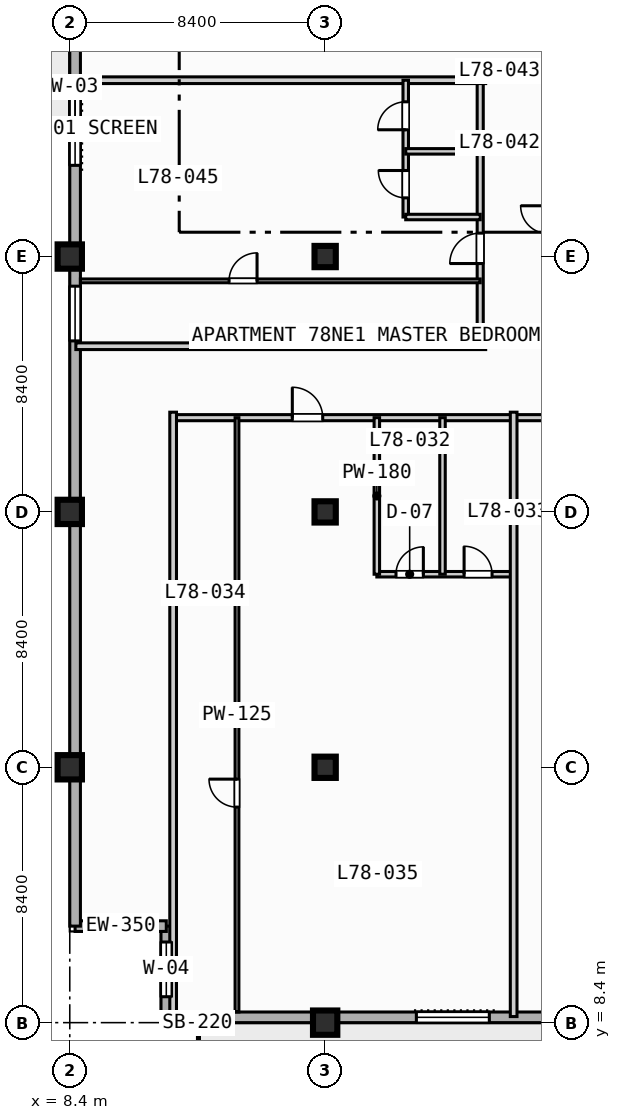
"""IFC4 building model, lengths in metres.
Left out: names, types, materials, properties, quantities, classifications, styles, units other than length and angle.
Written with IfcOpenShell. Run it as: python <this file> out.ifc"""

import sys

from ifc_helpers import new_model, si_unit, direction, frame, frame_2d, origin, origin_2d, place, context, subcontext, project, spatial, rectangle, extrude, element, fill, save


model = new_model("IFC4")
c1 = context("Model", 3, precision=1e-05, world=origin(), true_north=direction((0.0, 1.0)))
c2 = subcontext(c1, "Body", "Model", "MODEL_VIEW")
j1 = project(units=[si_unit("LENGTHUNIT", "METRE"), si_unit("PLANEANGLEUNIT", "RADIAN")], contexts=[c1])
p1 = place(None, origin())
s1 = spatial("IfcSite", under=j1, at=p1, CompositionType="ELEMENT")
p2 = place(p1, origin())
s2 = spatial("IfcBuilding", under=s1, at=p2, CompositionType="ELEMENT")
p3 = place(p2, frame((0.0, 0.0, 316.4)))
s3 = spatial("IfcBuildingStorey", under=s2, at=p3, CompositionType="ELEMENT", Elevation=316.4)
for number, where, z_axis, x_axis in (
    (1, (8.4, 16.8, 0.0), (0.0, 0.0, 1.0), (1.0, 0.0, 0.0)),
    (2, (8.4, 25.2, 0.0), (0.0, 0.0, 1.0), (1.0, 0.0, 0.0)),
    (3, (8.4, 33.6, 0.0), (0.0, 0.0, 1.0), (1.0, 0.0, 0.0)),
    (4, (16.8, 8.4, 0.0), (0.0, 0.0, 1.0), (1.0, 0.0, 0.0)),
):
    element("IfcColumn", number, at=place(p3, frame(where, z_axis=z_axis, x_axis=x_axis)), inside=s3, PredefinedType="COLUMN", context=c2, shape_type="SweptSolid", body=[
        extrude(rectangle(XDim=0.8, YDim=0.8, at=origin_2d()), origin(), (0.0, 0.0, 1.0), 3.9),
    ])
for number, where, z_axis, x_axis in (
    (5, (16.8, 16.8, 0.0), (0.0, 0.0, 1.0), (1.0, 0.0, 0.0)),
    (6, (16.8, 25.2, 0.0), (0.0, 0.0, 1.0), (1.0, 0.0, 0.0)),
    (7, (16.8, 33.6, 0.0), (0.0, 0.0, 1.0), (1.0, 0.0, 0.0)),
):
    element("IfcColumn", number, at=place(p3, frame(where, z_axis=z_axis, x_axis=x_axis)), inside=s3, PredefinedType="COLUMN", context=c2, shape_type="SweptSolid", body=[
        extrude(rectangle(XDim=0.7, YDim=0.7, at=origin_2d()), origin(), (0.0, 0.0, 1.0), 3.9),
    ])
p4 = place(p3, frame((11.575, 8.575, 0.0), z_axis=(0.0, 0.0, 1.0), x_axis=(0.0, 1.0, 0.0)))
e8 = element("IfcWall", 8, at=p4, inside=s3, PredefinedType="STANDARD", context=c2, shape_type="SweptSolid", body=[
    extrude(rectangle(XDim=3.0, YDim=0.35, at=frame_2d((1.5, 0.0))), origin(), (0.0, 0.0, 1.0), 3.67),
])
p5 = place(p4, frame((0.677, 0.0, 0.85)))
e9 = element("IfcOpeningElement", 9, at=p5, cuts=e8, PredefinedType="OPENING", context=c2, shape_type="SweptSolid", body=[
    extrude(rectangle(XDim=1.8, YDim=1.8, at=frame_2d((0.9, 0.9))), frame((0.0, 0.185, 0.0), z_axis=(0.0, -1.0, 0.0), x_axis=(1.0, 0.0, 0.0)), (0.0, 0.0, 1.0), 0.37),
])
p6 = place(p3, frame((11.575, 11.575, 0.0), z_axis=(0.0, 0.0, 1.0), x_axis=(-1.0, 0.0, 0.0)))
e10 = element("IfcWall", 10, at=p6, inside=s3, PredefinedType="STANDARD", context=c2, shape_type="SweptSolid", body=[
    extrude(rectangle(XDim=3.0, YDim=0.35, at=frame_2d((1.5, 0.0))), origin(), (0.0, 0.0, 1.0), 3.67),
])
p7 = place(p3, frame((8.575, 11.575, 0.0), z_axis=(0.0, 0.0, 1.0), x_axis=(0.0, 1.0, 0.0)))
e11 = element("IfcWall", 11, at=p7, inside=s3, PredefinedType="STANDARD", context=c2, shape_type="SweptSolid", body=[
    extrude(rectangle(XDim=60.85, YDim=0.35, at=frame_2d((30.425, 0.0))), origin(), (0.0, 0.0, 1.0), 3.67),
])
p8 = place(p7, frame((33.925, 0.0, 0.0)))
e12 = element("IfcOpeningElement", 12, at=p8, cuts=e11, PredefinedType="OPENING", context=c2, shape_type="SweptSolid", body=[
    extrude(rectangle(XDim=1.4, YDim=2.2, at=frame_2d((0.7, 1.1))), frame((0.0, 0.185, 0.0), z_axis=(0.0, -1.0, 0.0), x_axis=(1.0, 0.0, 0.0)), (0.0, 0.0, 1.0), 0.37),
])
p9 = place(p7, frame((25.025, 0.0, 0.85)))
e13 = element("IfcOpeningElement", 13, at=p9, cuts=e11, PredefinedType="OPENING", context=c2, shape_type="SweptSolid", body=[
    extrude(rectangle(XDim=2.4, YDim=1.95, at=frame_2d((1.2, 0.975))), frame((0.0, 0.185, 0.0), z_axis=(0.0, -1.0, 0.0), x_axis=(1.0, 0.0, 0.0)), (0.0, 0.0, 1.0), 0.37),
])
p10 = place(p7, frame((41.825, 0.0, 0.85)))
e14 = element("IfcOpeningElement", 14, at=p10, cuts=e11, PredefinedType="OPENING", context=c2, shape_type="SweptSolid", body=[
    extrude(rectangle(XDim=2.4, YDim=1.95, at=frame_2d((1.2, 0.975))), frame((0.0, 0.185, 0.0), z_axis=(0.0, -1.0, 0.0), x_axis=(1.0, 0.0, 0.0)), (0.0, 0.0, 1.0), 0.37),
])
p11 = place(p7, frame((19.25, 0.0, 0.85)))
e15 = element("IfcOpeningElement", 15, at=p11, cuts=e11, PredefinedType="OPENING", context=c2, shape_type="SweptSolid", body=[
    extrude(rectangle(XDim=1.8, YDim=1.8, at=frame_2d((0.9, 0.9))), frame((0.0, 0.185, 0.0), z_axis=(0.0, -1.0, 0.0), x_axis=(1.0, 0.0, 0.0)), (0.0, 0.0, 1.0), 0.37),
])
p12 = place(p3, frame((64.025, 8.575, 0.0), z_axis=(0.0, 0.0, 1.0), x_axis=(-1.0, 0.0, 0.0)))
e16 = element("IfcWall", 16, at=p12, inside=s3, PredefinedType="STANDARD", context=c2, shape_type="SweptSolid", body=[
    extrude(rectangle(XDim=52.45, YDim=0.35, at=frame_2d((26.225, 0.0))), origin(), (0.0, 0.0, 1.0), 3.67),
])
p13 = place(p12, frame((33.925, 0.0, 0.0)))
e17 = element("IfcOpeningElement", 17, at=p13, cuts=e16, PredefinedType="OPENING", context=c2, shape_type="SweptSolid", body=[
    extrude(rectangle(XDim=1.4, YDim=2.2, at=frame_2d((0.7, 1.1))), frame((0.0, 0.185, 0.0), z_axis=(0.0, -1.0, 0.0), x_axis=(1.0, 0.0, 0.0)), (0.0, 0.0, 1.0), 0.37),
])
p14 = place(p12, frame((41.825, 0.0, 0.85)))
e18 = element("IfcOpeningElement", 18, at=p14, cuts=e16, PredefinedType="OPENING", context=c2, shape_type="SweptSolid", body=[
    extrude(rectangle(XDim=2.4, YDim=1.95, at=frame_2d((1.2, 0.975))), frame((0.0, 0.185, 0.0), z_axis=(0.0, -1.0, 0.0), x_axis=(1.0, 0.0, 0.0)), (0.0, 0.0, 1.0), 0.37),
])
p15 = place(p12, frame((25.025, 0.0, 0.85)))
e19 = element("IfcOpeningElement", 19, at=p15, cuts=e16, PredefinedType="OPENING", context=c2, shape_type="SweptSolid", body=[
    extrude(rectangle(XDim=2.4, YDim=1.95, at=frame_2d((1.2, 0.975))), frame((0.0, 0.185, 0.0), z_axis=(0.0, -1.0, 0.0), x_axis=(1.0, 0.0, 0.0)), (0.0, 0.0, 1.0), 0.37),
])
p16 = place(p12, frame((16.925, 0.0, 0.85)))
e20 = element("IfcOpeningElement", 20, at=p16, cuts=e16, PredefinedType="OPENING", context=c2, shape_type="SweptSolid", body=[
    extrude(rectangle(XDim=1.8, YDim=1.8, at=frame_2d((0.9, 0.9))), frame((0.0, 0.185, 0.0), z_axis=(0.0, -1.0, 0.0), x_axis=(1.0, 0.0, 0.0)), (0.0, 0.0, 1.0), 0.37),
])
p17 = place(p12, frame((50.275, 0.0, 0.85)))
e21 = element("IfcOpeningElement", 21, at=p17, cuts=e16, PredefinedType="OPENING", context=c2, shape_type="SweptSolid", body=[
    extrude(rectangle(XDim=1.8, YDim=1.8, at=frame_2d((0.9, 0.9))), frame((0.0, 0.185, 0.0), z_axis=(0.0, -1.0, 0.0), x_axis=(1.0, 0.0, 0.0)), (0.0, 0.0, 1.0), 0.37),
])
p18 = place(p3, frame((11.8, 28.3, 0.0), z_axis=(0.0, 0.0, 1.0), x_axis=(1.0, 0.0, 0.0)))
e22 = element("IfcWall", 22, at=p18, inside=s3, PredefinedType="PARTITIONING", context=c2, shape_type="SweptSolid", body=[
    extrude(rectangle(XDim=27.6, YDim=0.2, at=frame_2d((13.8, 0.0))), origin(), (0.0, 0.0, 1.0), 3.67),
])
p19 = place(p18, frame((3.92, 0.0, 0.0)))
e23 = element("IfcOpeningElement", 23, at=p19, cuts=e22, PredefinedType="OPENING", context=c2, shape_type="SweptSolid", body=[
    extrude(rectangle(XDim=1.0, YDim=2.15, at=frame_2d((0.5, 1.075))), frame((0.0, 0.11, 0.0), z_axis=(0.0, -1.0, 0.0), x_axis=(1.0, 0.0, 0.0)), (0.0, 0.0, 1.0), 0.22),
])
p20 = place(p18, frame((12.57, 0.0, 0.0)))
e24 = element("IfcOpeningElement", 24, at=p20, cuts=e22, PredefinedType="OPENING", context=c2, shape_type="SweptSolid", body=[
    extrude(rectangle(XDim=1.0, YDim=2.15, at=frame_2d((0.5, 1.075))), frame((0.0, 0.11, 0.0), z_axis=(0.0, -1.0, 0.0), x_axis=(1.0, 0.0, 0.0)), (0.0, 0.0, 1.0), 0.22),
])
p21 = place(p18, frame((20.77, 0.0, 0.0)))
e25 = element("IfcOpeningElement", 25, at=p21, cuts=e22, PredefinedType="OPENING", context=c2, shape_type="SweptSolid", body=[
    extrude(rectangle(XDim=1.0, YDim=2.15, at=frame_2d((0.5, 1.075))), frame((0.0, 0.11, 0.0), z_axis=(0.0, -1.0, 0.0), x_axis=(1.0, 0.0, 0.0)), (0.0, 0.0, 1.0), 0.22),
])
p22 = place(p3, frame((11.8, 8.6, 0.0), z_axis=(0.0, 0.0, 1.0), x_axis=(0.0, 1.0, 0.0)))
e26 = element("IfcWall", 26, at=p22, inside=s3, PredefinedType="PARTITIONING", context=c2, shape_type="SweptSolid", body=[
    extrude(rectangle(XDim=19.88, YDim=0.22, at=frame_2d((9.94, 0.0))), origin(), (0.0, 0.0, 1.0), 3.67),
])
p23 = place(p3, frame((18.5, 23.15, 0.0), z_axis=(0.0, 0.0, 1.0), x_axis=(1.0, 0.0, 0.0)))
e27 = element("IfcWall", 27, at=p23, inside=s3, PredefinedType="PLUMBINGWALL", context=c2, shape_type="SweptSolid", body=[
    extrude(rectangle(XDim=4.5, YDim=0.18, at=frame_2d((2.25, 0.0))), origin(), (0.0, 0.0, 1.0), 3.67),
])
p24 = place(p23, frame((0.63, 0.0, 0.0)))
e28 = element("IfcOpeningElement", 28, at=p24, cuts=e27, PredefinedType="OPENING", context=c2, shape_type="SweptSolid", body=[
    extrude(rectangle(XDim=0.9, YDim=2.1, at=frame_2d((0.45, 1.05))), frame((0.0, 0.1, 0.0), z_axis=(0.0, -1.0, 0.0), x_axis=(1.0, 0.0, 0.0)), (0.0, 0.0, 1.0), 0.2),
])
p25 = place(p23, frame((2.87, 0.0, 0.0)))
e29 = element("IfcOpeningElement", 29, at=p25, cuts=e27, PredefinedType="OPENING", context=c2, shape_type="SweptSolid", body=[
    extrude(rectangle(XDim=0.92, YDim=2.1, at=frame_2d((0.46, 1.05))), frame((0.0, 0.1, 0.0), z_axis=(0.0, -1.0, 0.0), x_axis=(1.0, 0.0, 0.0)), (0.0, 0.0, 1.0), 0.2),
])
for number, where, z_axis, x_axis in (
    (30, (18.5, 23.15, 0.0), (0.0, 0.0, 1.0), (0.0, 1.0, 0.0)),
    (31, (20.66, 23.15, 0.0), (0.0, 0.0, 1.0), (0.0, 1.0, 0.0)),
):
    element("IfcWall", number, at=place(p3, frame(where, z_axis=z_axis, x_axis=x_axis)), inside=s3, PredefinedType="PLUMBINGWALL", context=c2, shape_type="SweptSolid", body=[
        extrude(rectangle(XDim=5.15, YDim=0.18, at=frame_2d((2.575, 0.0))), origin(), (0.0, 0.0, 1.0), 3.67),
    ])
p26 = place(p3, frame((13.9, 8.75, 0.0), z_axis=(0.0, 0.0, 1.0), x_axis=(0.0, 1.0, 0.0)))
e32 = element("IfcWall", 32, at=p26, inside=s3, PredefinedType="PARTITIONING", context=c2, shape_type="SweptSolid", body=[
    extrude(rectangle(XDim=19.55, YDim=0.125, at=frame_2d((9.775, 0.0))), origin(), (0.0, 0.0, 1.0), 3.67),
])
p27 = place(p26, frame((6.74, 0.0, 0.0)))
e33 = element("IfcOpeningElement", 33, at=p27, cuts=e32, PredefinedType="OPENING", context=c2, shape_type="SweptSolid", body=[
    extrude(rectangle(XDim=0.92, YDim=2.1, at=frame_2d((0.46, 1.05))), frame((0.0, 0.073, 0.0), z_axis=(0.0, -1.0, 0.0), x_axis=(1.0, 0.0, 0.0)), (0.0, 0.0, 1.0), 0.145),
])
p28 = place(p3, frame((23.0, 8.6, 0.0), z_axis=(0.0, 0.0, 1.0), x_axis=(0.0, 1.0, 0.0)))
e34 = element("IfcWall", 34, at=p28, inside=s3, PredefinedType="PARTITIONING", context=c2, shape_type="SweptSolid", body=[
    extrude(rectangle(XDim=19.88, YDim=0.22, at=frame_2d((9.94, 0.0))), origin(), (0.0, 0.0, 1.0), 3.67),
])
p29 = place(p3, frame((21.9, 30.65, 0.0), z_axis=(0.0, 0.0, 1.0), x_axis=(0.0, 1.0, 0.0)))
e35 = element("IfcWall", 35, at=p29, inside=s3, PredefinedType="PARTITIONING", context=c2, shape_type="SweptSolid", body=[
    extrude(rectangle(XDim=8.75, YDim=0.2, at=frame_2d((4.375, 0.0))), origin(), (0.0, 0.0, 1.0), 3.67),
])
p30 = place(p29, frame((2.72, 0.0, 0.0)))
e36 = element("IfcOpeningElement", 36, at=p30, cuts=e35, PredefinedType="OPENING", context=c2, shape_type="SweptSolid", body=[
    extrude(rectangle(XDim=1.0, YDim=2.15, at=frame_2d((0.5, 1.075))), frame((0.0, 0.11, 0.0), z_axis=(0.0, -1.0, 0.0), x_axis=(1.0, 0.0, 0.0)), (0.0, 0.0, 1.0), 0.22),
])
for number, where, z_axis, x_axis in (
    (37, (8.6, 30.65, 0.0), (0.0, 0.0, 1.0), (1.0, 0.0, 0.0)),
    (38, (8.6, 39.4, 0.0), (0.0, 0.0, 1.0), (1.0, 0.0, 0.0)),
):
    element("IfcWall", number, at=place(p3, frame(where, z_axis=z_axis, x_axis=x_axis)), inside=s3, PredefinedType="PARTITIONING", context=c2, shape_type="SweptSolid", body=[
        extrude(rectangle(XDim=13.48, YDim=0.22, at=frame_2d((6.74, 0.0))), origin(), (0.0, 0.0, 1.0), 3.67),
    ])
p31 = place(p3, frame((19.45, 34.9, 0.0), z_axis=(0.0, 0.0, 1.0), x_axis=(0.0, 1.0, 0.0)))
e39 = element("IfcWall", 39, at=p31, inside=s3, PredefinedType="PLUMBINGWALL", context=c2, shape_type="SweptSolid", body=[
    extrude(rectangle(XDim=4.5, YDim=0.18, at=frame_2d((2.25, 0.0))), origin(), (0.0, 0.0, 1.0), 3.67),
])
p32 = place(p31, frame((0.63, 0.0, 0.0)))
e40 = element("IfcOpeningElement", 40, at=p32, cuts=e39, PredefinedType="OPENING", context=c2, shape_type="SweptSolid", body=[
    extrude(rectangle(XDim=0.9, YDim=2.1, at=frame_2d((0.45, 1.05))), frame((0.0, 0.1, 0.0), z_axis=(0.0, -1.0, 0.0), x_axis=(1.0, 0.0, 0.0)), (0.0, 0.0, 1.0), 0.2),
])
p33 = place(p31, frame((2.87, 0.0, 0.0)))
e41 = element("IfcOpeningElement", 41, at=p33, cuts=e39, PredefinedType="OPENING", context=c2, shape_type="SweptSolid", body=[
    extrude(rectangle(XDim=0.92, YDim=2.1, at=frame_2d((0.46, 1.05))), frame((0.0, 0.1, 0.0), z_axis=(0.0, -1.0, 0.0), x_axis=(1.0, 0.0, 0.0)), (0.0, 0.0, 1.0), 0.2),
])
for number, where, z_axis, x_axis in (
    (42, (19.45, 34.9, 0.0), (0.0, 0.0, 1.0), (1.0, 0.0, 0.0)),
    (43, (19.45, 37.06, 0.0), (0.0, 0.0, 1.0), (1.0, 0.0, 0.0)),
):
    element("IfcWall", number, at=place(p3, frame(where, z_axis=z_axis, x_axis=x_axis)), inside=s3, PredefinedType="PLUMBINGWALL", context=c2, shape_type="SweptSolid", body=[
        extrude(rectangle(XDim=2.45, YDim=0.18, at=frame_2d((1.225, 0.0))), origin(), (0.0, 0.0, 1.0), 3.67),
    ])
p34 = place(p3, frame((8.75, 32.8, 0.0), z_axis=(0.0, 0.0, 1.0), x_axis=(1.0, 0.0, 0.0)))
e44 = element("IfcWall", 44, at=p34, inside=s3, PredefinedType="PARTITIONING", context=c2, shape_type="SweptSolid", body=[
    extrude(rectangle(XDim=13.15, YDim=0.125, at=frame_2d((6.575, 0.0))), origin(), (0.0, 0.0, 1.0), 3.67),
])
p35 = place(p34, frame((4.89, 0.0, 0.0)))
e45 = element("IfcOpeningElement", 45, at=p35, cuts=e44, PredefinedType="OPENING", context=c2, shape_type="SweptSolid", body=[
    extrude(rectangle(XDim=0.92, YDim=2.1, at=frame_2d((0.46, 1.05))), frame((0.0, 0.073, 0.0), z_axis=(0.0, -1.0, 0.0), x_axis=(1.0, 0.0, 0.0)), (0.0, 0.0, 1.0), 0.145),
])
p36 = place(p5, origin())
e46 = element("IfcWindow", 46, at=p36, inside=s3, PartitioningType="SINGLE_PANEL", PredefinedType="WINDOW", context=c2, shape_type="SweptSolid", body=[
    extrude(rectangle(XDim=1.8, YDim=1.8, at=frame_2d((0.9, 0.9))), frame((0.0, 0.03, 0.0), z_axis=(0.0, -1.0, 0.0), x_axis=(1.0, 0.0, 0.0)), (0.0, 0.0, 1.0), 0.06),
])
fill(e9, e46)
p37 = place(p9, origin())
e47 = element("IfcWindow", 47, at=p37, inside=s3, PartitioningType="SINGLE_PANEL", PredefinedType="WINDOW", context=c2, shape_type="SweptSolid", body=[
    extrude(rectangle(XDim=2.4, YDim=1.95, at=frame_2d((1.2, 0.975))), frame((0.0, 0.03, 0.0), z_axis=(0.0, -1.0, 0.0), x_axis=(1.0, 0.0, 0.0)), (0.0, 0.0, 1.0), 0.06),
])
fill(e13, e47)
p38 = place(p11, origin())
e48 = element("IfcWindow", 48, at=p38, inside=s3, PartitioningType="SINGLE_PANEL", PredefinedType="WINDOW", context=c2, shape_type="SweptSolid", body=[
    extrude(rectangle(XDim=1.8, YDim=1.8, at=frame_2d((0.9, 0.9))), frame((0.0, 0.03, 0.0), z_axis=(0.0, -1.0, 0.0), x_axis=(1.0, 0.0, 0.0)), (0.0, 0.0, 1.0), 0.06),
])
fill(e15, e48)
p39 = place(p14, origin())
e49 = element("IfcWindow", 49, at=p39, inside=s3, PartitioningType="SINGLE_PANEL", PredefinedType="WINDOW", context=c2, shape_type="SweptSolid", body=[
    extrude(rectangle(XDim=2.4, YDim=1.95, at=frame_2d((1.2, 0.975))), frame((0.0, 0.03, 0.0), z_axis=(0.0, -1.0, 0.0), x_axis=(1.0, 0.0, 0.0)), (0.0, 0.0, 1.0), 0.06),
])
fill(e18, e49)
p40 = place(p17, origin())
e50 = element("IfcWindow", 50, at=p40, inside=s3, PartitioningType="SINGLE_PANEL", PredefinedType="WINDOW", context=c2, shape_type="SweptSolid", body=[
    extrude(rectangle(XDim=1.8, YDim=1.8, at=frame_2d((0.9, 0.9))), frame((0.0, 0.03, 0.0), z_axis=(0.0, -1.0, 0.0), x_axis=(1.0, 0.0, 0.0)), (0.0, 0.0, 1.0), 0.06),
])
fill(e21, e50)
p41 = place(p19, origin())
e51 = element("IfcDoor", 51, at=p41, inside=s3, OperationType="SINGLE_SWING_LEFT", PredefinedType="DOOR", context=c2, shape_type="SweptSolid", body=[
    extrude(rectangle(XDim=1.0, YDim=2.15, at=frame_2d((0.5, 1.075))), frame((0.0, 0.025, 0.0), z_axis=(0.0, -1.0, 0.0), x_axis=(1.0, 0.0, 0.0)), (0.0, 0.0, 1.0), 0.05),
])
fill(e23, e51)
p42 = place(p24, origin())
e52 = element("IfcDoor", 52, at=p42, inside=s3, OperationType="SINGLE_SWING_RIGHT", PredefinedType="DOOR", context=c2, shape_type="SweptSolid", body=[
    extrude(rectangle(XDim=0.9, YDim=2.1, at=frame_2d((0.45, 1.05))), frame((0.0, 0.025, 0.0), z_axis=(0.0, -1.0, 0.0), x_axis=(1.0, 0.0, 0.0)), (0.0, 0.0, 1.0), 0.05),
])
fill(e28, e52)
p43 = place(p25, origin())
e53 = element("IfcDoor", 53, at=p43, inside=s3, OperationType="SINGLE_SWING_LEFT", PredefinedType="DOOR", context=c2, shape_type="SweptSolid", body=[
    extrude(rectangle(XDim=0.92, YDim=2.1, at=frame_2d((0.46, 1.05))), frame((0.0, 0.025, 0.0), z_axis=(0.0, -1.0, 0.0), x_axis=(1.0, 0.0, 0.0)), (0.0, 0.0, 1.0), 0.05),
])
fill(e29, e53)
p44 = place(p27, origin())
e54 = element("IfcDoor", 54, at=p44, inside=s3, OperationType="SINGLE_SWING_RIGHT", PredefinedType="DOOR", context=c2, shape_type="SweptSolid", body=[
    extrude(rectangle(XDim=0.92, YDim=2.1, at=frame_2d((0.46, 1.05))), frame((0.0, 0.025, 0.0), z_axis=(0.0, -1.0, 0.0), x_axis=(1.0, 0.0, 0.0)), (0.0, 0.0, 1.0), 0.05),
])
fill(e33, e54)
p45 = place(p30, origin())
e55 = element("IfcDoor", 55, at=p45, inside=s3, OperationType="SINGLE_SWING_LEFT", PredefinedType="DOOR", context=c2, shape_type="SweptSolid", body=[
    extrude(rectangle(XDim=1.0, YDim=2.15, at=frame_2d((0.5, 1.075))), frame((0.0, 0.025, 0.0), z_axis=(0.0, -1.0, 0.0), x_axis=(1.0, 0.0, 0.0)), (0.0, 0.0, 1.0), 0.05),
])
fill(e36, e55)
p46 = place(p32, origin())
e56 = element("IfcDoor", 56, at=p46, inside=s3, OperationType="SINGLE_SWING_RIGHT", PredefinedType="DOOR", context=c2, shape_type="SweptSolid", body=[
    extrude(rectangle(XDim=0.9, YDim=2.1, at=frame_2d((0.45, 1.05))), frame((0.0, 0.025, 0.0), z_axis=(0.0, -1.0, 0.0), x_axis=(1.0, 0.0, 0.0)), (0.0, 0.0, 1.0), 0.05),
])
fill(e40, e56)
p47 = place(p33, origin())
e57 = element("IfcDoor", 57, at=p47, inside=s3, OperationType="SINGLE_SWING_LEFT", PredefinedType="DOOR", context=c2, shape_type="SweptSolid", body=[
    extrude(rectangle(XDim=0.92, YDim=2.1, at=frame_2d((0.46, 1.05))), frame((0.0, 0.025, 0.0), z_axis=(0.0, -1.0, 0.0), x_axis=(1.0, 0.0, 0.0)), (0.0, 0.0, 1.0), 0.05),
])
fill(e41, e57)
p48 = place(p35, origin())
e58 = element("IfcDoor", 58, at=p48, inside=s3, OperationType="SINGLE_SWING_RIGHT", PredefinedType="DOOR", context=c2, shape_type="SweptSolid", body=[
    extrude(rectangle(XDim=0.92, YDim=2.1, at=frame_2d((0.46, 1.05))), frame((0.0, 0.025, 0.0), z_axis=(0.0, -1.0, 0.0), x_axis=(1.0, 0.0, 0.0)), (0.0, 0.0, 1.0), 0.05),
])
fill(e45, e58)
save(model, sys.argv[1])
